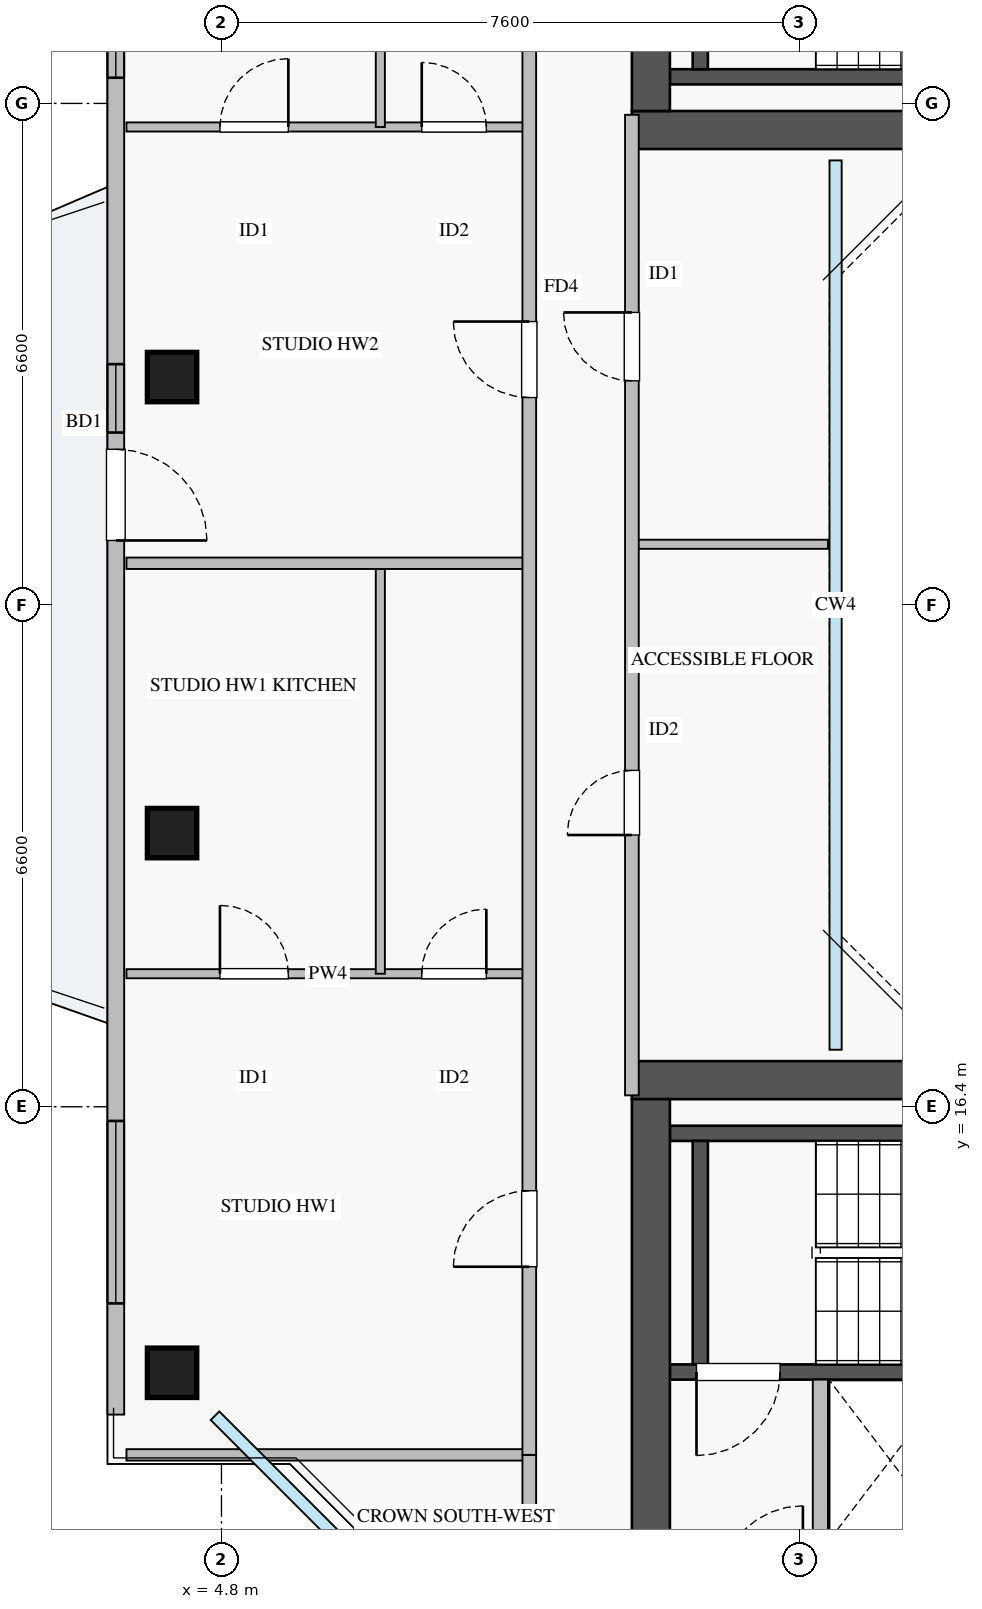
"""IFC4 building model, lengths in metres.
Left out: names, types, materials, properties, quantities, classifications, styles, units other than length and angle.
Written with IfcOpenShell. Run it as: python <this file> out.ifc"""

import sys

from ifc_helpers import new_model, si_unit, direction, frame, frame_2d, origin, origin_2d, place, context, subcontext, project, spatial, rectangle, extrude, source, transform, mapped, element, fill, save


model = new_model("IFC4")
c1 = context("Model", 3, precision=1e-05, world=origin(), true_north=direction((0.0, 1.0)))
c2 = subcontext(c1, "Body", "Model", "MODEL_VIEW")
j1 = project(units=[si_unit("LENGTHUNIT", "METRE"), si_unit("PLANEANGLEUNIT", "RADIAN")], contexts=[c1])
p1 = place(None, origin())
s1 = spatial("IfcSite", under=j1, at=p1, CompositionType="ELEMENT")
p2 = place(p1, origin())
s2 = spatial("IfcBuilding", under=s1, at=p2, CompositionType="ELEMENT")
p3 = place(p2, frame((0.0, 0.0, 250.25)))
s3 = spatial("IfcBuildingStorey", under=s2, at=p3, CompositionType="ELEMENT", Elevation=250.25)
p4 = place(p3, frame((12.68, 12.8, 0.0), z_axis=(0.0, 0.0, 1.0), x_axis=(1.0, 0.0, 0.0)))
e1 = element("IfcWall", 1, at=p4, inside=s3, PredefinedType="SHEAR", context=c2, shape_type="SweptSolid", body=[
    extrude(rectangle(XDim=1.94, YDim=0.18, at=frame_2d((0.97, 0.0))), origin(), (0.0, 0.0, 1.0), 3.07),
])
p5 = place(p3, frame((10.7, 29.95, 0.0), z_axis=(0.0, 0.0, 1.0), x_axis=(1.0, 0.0, 0.0)))
e2 = element("IfcWall", 2, at=p5, inside=s3, PredefinedType="SHEAR", context=c2, shape_type="SweptSolid", body=[
    extrude(rectangle(XDim=7.45, YDim=0.2, at=frame_2d((3.725, 0.0))), origin(), (0.0, 0.0, 1.0), 3.25),
])
p6 = place(p3, frame((11.1, 30.05, 0.0), z_axis=(0.0, 0.0, 1.0), x_axis=(0.0, 1.0, 0.0)))
e3 = element("IfcWall", 3, at=p6, inside=s3, PredefinedType="SHEAR", context=c2, shape_type="SweptSolid", body=[
    extrude(rectangle(XDim=2.94, YDim=0.2, at=frame_2d((1.47, 0.0))), origin(), (0.0, 0.0, 1.0), 3.25),
])
p7 = place(p3, frame((10.7, 12.91, 0.0), z_axis=(0.0, 0.0, 1.0), x_axis=(1.0, 0.0, 0.0)))
e4 = element("IfcWall", 4, at=p7, inside=s3, PredefinedType="SHEAR", context=c2, shape_type="SweptSolid", body=[
    extrude(rectangle(XDim=7.45, YDim=0.2, at=frame_2d((3.725, 0.0))), origin(), (0.0, 0.0, 1.0), 3.25),
])
p8 = place(p7, frame((0.35, 0.0, 0.0)))
e5 = element("IfcOpeningElement", 5, at=p8, cuts=e4, PredefinedType="OPENING", context=c2, shape_type="SweptSolid", body=[
    extrude(rectangle(XDim=1.1, YDim=2.05, at=frame_2d((0.55, 1.025))), frame((0.0, 0.11, 0.0), z_axis=(0.0, -1.0, 0.0), x_axis=(1.0, 0.0, 0.0)), (0.0, 0.0, 1.0), 0.22),
])
p9 = place(p3, frame((10.7, 16.05, 0.0), z_axis=(0.0, 0.0, 1.0), x_axis=(1.0, 0.0, 0.0)))
e6 = element("IfcWall", 6, at=p9, inside=s3, PredefinedType="SHEAR", context=c2, shape_type="SweptSolid", body=[
    extrude(rectangle(XDim=7.45, YDim=0.2, at=frame_2d((3.725, 0.0))), origin(), (0.0, 0.0, 1.0), 3.25),
])
p10 = place(p3, frame((11.1, 13.01, 0.0), z_axis=(0.0, 0.0, 1.0), x_axis=(0.0, 1.0, 0.0)))
e7 = element("IfcWall", 7, at=p10, inside=s3, PredefinedType="SHEAR", context=c2, shape_type="SweptSolid", body=[
    extrude(rectangle(XDim=2.94, YDim=0.2, at=frame_2d((1.47, 0.0))), origin(), (0.0, 0.0, 1.0), 3.25),
])
p11 = place(p3, frame((10.2, 29.25, 0.0), z_axis=(0.0, 0.0, 1.0), x_axis=(1.0, 0.0, 0.0)))
e8 = element("IfcWall", 8, at=p11, inside=s3, PredefinedType="SHEAR", context=c2, shape_type="SweptSolid", body=[
    extrude(rectangle(XDim=17.6, YDim=0.5, at=frame_2d((8.8, 0.0))), origin(), (0.0, 0.0, 1.0), 3.25),
])
p12 = place(p3, frame((10.45, 29.5, 0.0), z_axis=(0.0, 0.0, 1.0), x_axis=(0.0, 1.0, 0.0)))
e9 = element("IfcWall", 9, at=p12, inside=s3, PredefinedType="SHEAR", context=c2, shape_type="SweptSolid", body=[
    extrude(rectangle(XDim=6.2, YDim=0.5, at=frame_2d((3.1, 0.0))), origin(), (0.0, 0.0, 1.0), 3.25),
])
p13 = place(p3, frame((10.2, 16.75, 0.0), z_axis=(0.0, 0.0, 1.0), x_axis=(1.0, 0.0, 0.0)))
e10 = element("IfcWall", 10, at=p13, inside=s3, PredefinedType="SHEAR", context=c2, shape_type="SweptSolid", body=[
    extrude(rectangle(XDim=17.6, YDim=0.5, at=frame_2d((8.8, 0.0))), origin(), (0.0, 0.0, 1.0), 3.25),
])
p14 = place(p3, frame((10.45, 10.3, 0.0), z_axis=(0.0, 0.0, 1.0), x_axis=(0.0, 1.0, 0.0)))
e11 = element("IfcWall", 11, at=p14, inside=s3, PredefinedType="SHEAR", context=c2, shape_type="SweptSolid", body=[
    extrude(rectangle(XDim=6.2, YDim=0.5, at=frame_2d((3.1, 0.0))), origin(), (0.0, 0.0, 1.0), 3.25),
])
m1 = source(origin(), c2, "Body", "SweptSolid", [
    extrude(rectangle(XDim=0.65, YDim=0.65, at=origin_2d()), origin(), (0.0, 0.0, 1.0), 3.25),
])
for number, where, z_axis, x_axis in (
    (12, (4.15, 26.0, 0.0), (0.0, 0.0, 1.0), (1.0, 0.0, 0.0)),
    (13, (4.15, 20.0, 0.0), (0.0, 0.0, 1.0), (1.0, 0.0, 0.0)),
    (14, (4.15, 12.9, 0.0), (0.0, 0.0, 1.0), (1.0, 0.0, 0.0)),
):
    element("IfcColumn", number, at=place(p3, frame(where, z_axis=z_axis, x_axis=x_axis)), inside=s3, PredefinedType="COLUMN", context=c2, shape_type="MappedRepresentation", body=[
        mapped(m1, transform((0.0, 0.0, 0.0), x_axis=(1.0, 0.0, 0.0), y_axis=(0.0, 1.0, 0.0), z_axis=(0.0, 0.0, 1.0), scale=1.0)),
    ])
p15 = place(p3, frame((3.41, 12.35, 0.0), z_axis=(0.0, 0.0, 1.0), x_axis=(0.0, 1.0, 0.0)))
e15 = element("IfcWall", 15, at=p15, inside=s3, PredefinedType="STANDARD", context=c2, shape_type="SweptSolid", body=[
    extrude(rectangle(XDim=21.3, YDim=0.22, at=frame_2d((10.65, 0.0))), origin(), (0.0, 0.0, 1.0), 2.61),
])
p16 = place(p15, frame((11.5, 0.0, 0.0)))
e16 = element("IfcOpeningElement", 16, at=p16, cuts=e15, PredefinedType="OPENING", context=c2, shape_type="SweptSolid", body=[
    extrude(rectangle(XDim=1.2, YDim=2.1, at=frame_2d((0.6, 1.05))), frame((0.0, 0.12, 0.0), z_axis=(0.0, -1.0, 0.0), x_axis=(1.0, 0.0, 0.0)), (0.0, 0.0, 1.0), 0.24),
])
p17 = place(p15, frame((1.463, 0.0, 0.9)))
e17 = element("IfcOpeningElement", 17, at=p17, cuts=e15, PredefinedType="OPENING", context=c2, shape_type="SweptSolid", body=[
    extrude(rectangle(XDim=2.4, YDim=1.48, at=frame_2d((1.2, 0.74))), frame((0.0, 0.12, 0.0), z_axis=(0.0, -1.0, 0.0), x_axis=(1.0, 0.0, 0.0)), (0.0, 0.0, 1.0), 0.24),
])
p18 = place(p15, frame((17.588, 0.0, 0.9)))
e18 = element("IfcOpeningElement", 18, at=p18, cuts=e15, PredefinedType="OPENING", context=c2, shape_type="SweptSolid", body=[
    extrude(rectangle(XDim=2.1, YDim=1.48, at=frame_2d((1.05, 0.74))), frame((0.0, 0.12, 0.0), z_axis=(0.0, -1.0, 0.0), x_axis=(1.0, 0.0, 0.0)), (0.0, 0.0, 1.0), 0.24),
])
p19 = place(p15, frame((12.92, 0.0, 0.9)))
e19 = element("IfcOpeningElement", 19, at=p19, cuts=e15, PredefinedType="OPENING", context=c2, shape_type="SweptSolid", body=[
    extrude(rectangle(XDim=0.9, YDim=1.2, at=frame_2d((0.45, 0.6))), frame((0.0, 0.12, 0.0), z_axis=(0.0, -1.0, 0.0), x_axis=(1.0, 0.0, 0.0)), (0.0, 0.0, 1.0), 0.24),
])
p20 = place(p3, frame((12.68, 10.6, 0.0), z_axis=(0.0, 0.0, 1.0), x_axis=(0.0, 1.0, 0.0)))
e20 = element("IfcWall", 20, at=p20, inside=s3, PredefinedType="PARTITIONING", context=c2, shape_type="SweptSolid", body=[
    extrude(rectangle(XDim=2.21, YDim=0.2, at=frame_2d((1.105, 0.0))), origin(), (0.0, 0.0, 1.0), 3.07),
])
p21 = place(p3, frame((3.55, 11.82, 0.0), z_axis=(0.0, 0.0, 1.0), x_axis=(1.0, 0.0, 0.0)))
e21 = element("IfcWall", 21, at=p21, inside=s3, PredefinedType="PARTITIONING", context=c2, shape_type="SweptSolid", body=[
    extrude(rectangle(XDim=5.3, YDim=0.15, at=frame_2d((2.65, 0.0))), origin(), (0.0, 0.0, 1.0), 3.07),
])
p22 = place(p3, frame((8.85, 8.56, 0.0), z_axis=(0.0, 0.0, 1.0), x_axis=(0.0, 1.0, 0.0)))
e22 = element("IfcWall", 22, at=p22, inside=s3, PredefinedType="PARTITIONING", context=c2, shape_type="SweptSolid", body=[
    extrude(rectangle(XDim=3.26, YDim=0.18, at=frame_2d((1.63, 0.0))), origin(), (0.0, 0.0, 1.0), 2.569),
])
p23 = place(p3, frame((3.55, 18.15, 0.0), z_axis=(0.0, 0.0, 1.0), x_axis=(1.0, 0.0, 0.0)))
e23 = element("IfcWall", 23, at=p23, inside=s3, PredefinedType="PLUMBINGWALL", context=c2, shape_type="SweptSolid", body=[
    extrude(rectangle(XDim=5.3, YDim=0.12, at=frame_2d((2.65, 0.0))), origin(), (0.0, 0.0, 1.0), 2.821),
])
p24 = place(p23, frame((1.23, 0.0, 0.0)))
e24 = element("IfcOpeningElement", 24, at=p24, cuts=e23, PredefinedType="OPENING", context=c2, shape_type="SweptSolid", body=[
    extrude(rectangle(XDim=0.9, YDim=2.05, at=frame_2d((0.45, 1.025))), frame((0.0, 0.07, 0.0), z_axis=(0.0, -1.0, 0.0), x_axis=(1.0, 0.0, 0.0)), (0.0, 0.0, 1.0), 0.14),
])
p25 = place(p23, frame((3.885, 0.0, 0.0)))
e25 = element("IfcOpeningElement", 25, at=p25, cuts=e23, PredefinedType="OPENING", context=c2, shape_type="SweptSolid", body=[
    extrude(rectangle(XDim=0.85, YDim=2.05, at=frame_2d((0.425, 1.025))), frame((0.0, 0.07, 0.0), z_axis=(0.0, -1.0, 0.0), x_axis=(1.0, 0.0, 0.0)), (0.0, 0.0, 1.0), 0.14),
])
p26 = place(p3, frame((6.89, 18.15, 0.0), z_axis=(0.0, 0.0, 1.0), x_axis=(0.0, 1.0, 0.0)))
e26 = element("IfcWall", 26, at=p26, inside=s3, PredefinedType="PLUMBINGWALL", context=c2, shape_type="SweptSolid", body=[
    extrude(rectangle(XDim=5.4, YDim=0.12, at=frame_2d((2.7, 0.0))), origin(), (0.0, 0.0, 1.0), 3.07),
])
p27 = place(p3, frame((3.55, 29.29, 0.0), z_axis=(0.0, 0.0, 1.0), x_axis=(1.0, 0.0, 0.0)))
e27 = element("IfcWall", 27, at=p27, inside=s3, PredefinedType="PLUMBINGWALL", context=c2, shape_type="SweptSolid", body=[
    extrude(rectangle(XDim=5.3, YDim=0.12, at=frame_2d((2.65, 0.0))), origin(), (0.0, 0.0, 1.0), 3.07),
])
p28 = place(p27, frame((1.23, 0.0, 0.0)))
e28 = element("IfcOpeningElement", 28, at=p28, cuts=e27, PredefinedType="OPENING", context=c2, shape_type="SweptSolid", body=[
    extrude(rectangle(XDim=0.9, YDim=2.05, at=frame_2d((0.45, 1.025))), frame((0.0, 0.07, 0.0), z_axis=(0.0, -1.0, 0.0), x_axis=(1.0, 0.0, 0.0)), (0.0, 0.0, 1.0), 0.14),
])
p29 = place(p27, frame((3.885, 0.0, 0.0)))
e29 = element("IfcOpeningElement", 29, at=p29, cuts=e27, PredefinedType="OPENING", context=c2, shape_type="SweptSolid", body=[
    extrude(rectangle(XDim=0.85, YDim=2.05, at=frame_2d((0.425, 1.025))), frame((0.0, 0.07, 0.0), z_axis=(0.0, -1.0, 0.0), x_axis=(1.0, 0.0, 0.0)), (0.0, 0.0, 1.0), 0.14),
])
p30 = place(p3, frame((6.89, 29.29, 0.0), z_axis=(0.0, 0.0, 1.0), x_axis=(0.0, 1.0, 0.0)))
e30 = element("IfcWall", 30, at=p30, inside=s3, PredefinedType="PLUMBINGWALL", context=c2, shape_type="SweptSolid", body=[
    extrude(rectangle(XDim=4.89, YDim=0.12, at=frame_2d((2.445, 0.0))), origin(), (0.0, 0.0, 1.0), 3.07),
])
p31 = place(p3, frame((3.55, 23.55, 0.0), z_axis=(0.0, 0.0, 1.0), x_axis=(1.0, 0.0, 0.0)))
e31 = element("IfcWall", 31, at=p31, inside=s3, PredefinedType="PARTITIONING", context=c2, shape_type="SweptSolid", body=[
    extrude(rectangle(XDim=5.3, YDim=0.15, at=frame_2d((2.65, 0.0))), origin(), (0.0, 0.0, 1.0), 3.07),
])
p32 = place(p3, frame((8.85, 11.82, 0.0), z_axis=(0.0, 0.0, 1.0), x_axis=(0.0, 1.0, 0.0)))
e32 = element("IfcWall", 32, at=p32, inside=s3, PredefinedType="PARTITIONING", context=c2, shape_type="SweptSolid", body=[
    extrude(rectangle(XDim=22.36, YDim=0.18, at=frame_2d((11.18, 0.0))), origin(), (0.0, 0.0, 1.0), 2.569),
])
p33 = place(p32, frame((2.475, 0.0, 0.0)))
e33 = element("IfcOpeningElement", 33, at=p33, cuts=e32, PredefinedType="OPENING", context=c2, shape_type="SweptSolid", body=[
    extrude(rectangle(XDim=1.0, YDim=2.05, at=frame_2d((0.5, 1.025))), frame((0.0, 0.1, 0.0), z_axis=(0.0, -1.0, 0.0), x_axis=(1.0, 0.0, 0.0)), (0.0, 0.0, 1.0), 0.2),
])
p34 = place(p32, frame((13.91, 0.0, 0.0)))
e34 = element("IfcOpeningElement", 34, at=p34, cuts=e32, PredefinedType="OPENING", context=c2, shape_type="SweptSolid", body=[
    extrude(rectangle(XDim=1.0, YDim=2.05, at=frame_2d((0.5, 1.025))), frame((0.0, 0.1, 0.0), z_axis=(0.0, -1.0, 0.0), x_axis=(1.0, 0.0, 0.0)), (0.0, 0.0, 1.0), 0.2),
])
p35 = place(p3, frame((10.2, 23.8, 0.0), z_axis=(0.0, 0.0, 1.0), x_axis=(1.0, 0.0, 0.0)))
e35 = element("IfcWall", 35, at=p35, inside=s3, PredefinedType="PLUMBINGWALL", context=c2, shape_type="SweptSolid", body=[
    extrude(rectangle(XDim=2.58, YDim=0.12, at=frame_2d((1.29, 0.0))), origin(), (0.0, 0.0, 1.0), 3.07),
])
p36 = place(p3, frame((10.2, 16.55, 0.0), z_axis=(0.0, 0.0, 1.0), x_axis=(0.0, 1.0, 0.0)))
e36 = element("IfcWall", 36, at=p36, inside=s3, PredefinedType="PARTITIONING", context=c2, shape_type="SweptSolid", body=[
    extrude(rectangle(XDim=12.9, YDim=0.18, at=frame_2d((6.45, 0.0))), origin(), (0.0, 0.0, 1.0), 3.07),
])
p37 = place(p36, frame((3.425, 0.0, 0.0)))
e37 = element("IfcOpeningElement", 37, at=p37, cuts=e36, PredefinedType="OPENING", context=c2, shape_type="SweptSolid", body=[
    extrude(rectangle(XDim=0.85, YDim=2.05, at=frame_2d((0.425, 1.025))), frame((0.0, 0.1, 0.0), z_axis=(0.0, -1.0, 0.0), x_axis=(1.0, 0.0, 0.0)), (0.0, 0.0, 1.0), 0.2),
])
p38 = place(p36, frame((9.4, 0.0, 0.0)))
e38 = element("IfcOpeningElement", 38, at=p38, cuts=e36, PredefinedType="OPENING", context=c2, shape_type="SweptSolid", body=[
    extrude(rectangle(XDim=0.9, YDim=2.05, at=frame_2d((0.45, 1.025))), frame((0.0, 0.1, 0.0), z_axis=(0.0, -1.0, 0.0), x_axis=(1.0, 0.0, 0.0)), (0.0, 0.0, 1.0), 0.2),
])
m2 = source(origin(), c2, "Body", "SweptSolid", [
    extrude(rectangle(XDim=1.2, YDim=2.1, at=frame_2d((0.6, 1.05))), frame((0.0, 0.025, 0.0), z_axis=(0.0, -1.0, 0.0), x_axis=(1.0, 0.0, 0.0)), (0.0, 0.0, 1.0), 0.05),
])
p39 = place(p16, frame((1.2, 0.0, 0.0), z_axis=(0.0, 0.0, 1.0), x_axis=(-1.0, 0.0, 0.0)))
e39 = element("IfcDoor", 39, at=p39, inside=s3, OperationType="SINGLE_SWING_LEFT", PredefinedType="DOOR", context=c2, shape_type="MappedRepresentation", body=[
    mapped(m2, transform((0.0, 0.0, 0.0), x_axis=(1.0, 0.0, 0.0), y_axis=(0.0, 1.0, 0.0), z_axis=(0.0, 0.0, 1.0), scale=1.0)),
])
fill(e16, e39)
m3 = source(origin(), c2, "Body", "SweptSolid", [
    extrude(rectangle(XDim=2.4, YDim=1.48, at=frame_2d((1.2, 0.74))), frame((0.0, 0.03, 0.0), z_axis=(0.0, -1.0, 0.0), x_axis=(1.0, 0.0, 0.0)), (0.0, 0.0, 1.0), 0.06),
])
p40 = place(p17, origin())
e40 = element("IfcWindow", 40, at=p40, inside=s3, PartitioningType="TRIPLE_PANEL_VERTICAL", PredefinedType="WINDOW", context=c2, shape_type="MappedRepresentation", body=[
    mapped(m3, transform((0.0, 0.0, 0.0), x_axis=(1.0, 0.0, 0.0), y_axis=(0.0, 1.0, 0.0), z_axis=(0.0, 0.0, 1.0), scale=1.0)),
])
fill(e17, e40)
m4 = source(origin(), c2, "Body", "SweptSolid", [
    extrude(rectangle(XDim=2.1, YDim=1.48, at=frame_2d((1.05, 0.74))), frame((0.0, 0.03, 0.0), z_axis=(0.0, -1.0, 0.0), x_axis=(1.0, 0.0, 0.0)), (0.0, 0.0, 1.0), 0.06),
])
p41 = place(p18, origin())
e41 = element("IfcWindow", 41, at=p41, inside=s3, PartitioningType="TRIPLE_PANEL_VERTICAL", PredefinedType="WINDOW", context=c2, shape_type="MappedRepresentation", body=[
    mapped(m4, transform((0.0, 0.0, 0.0), x_axis=(1.0, 0.0, 0.0), y_axis=(0.0, 1.0, 0.0), z_axis=(0.0, 0.0, 1.0), scale=1.0)),
])
fill(e18, e41)
m5 = source(origin(), c2, "Body", "SweptSolid", [
    extrude(rectangle(XDim=1.1, YDim=2.05, at=frame_2d((0.55, 1.025))), frame((0.0, 0.025, 0.0), z_axis=(0.0, -1.0, 0.0), x_axis=(1.0, 0.0, 0.0)), (0.0, 0.0, 1.0), 0.05),
])
p42 = place(p8, frame((1.1, 0.0, 0.0), z_axis=(0.0, 0.0, 1.0), x_axis=(-1.0, 0.0, 0.0)))
e42 = element("IfcDoor", 42, at=p42, inside=s3, OperationType="SINGLE_SWING_LEFT", PredefinedType="DOOR", context=c2, shape_type="MappedRepresentation", body=[
    mapped(m5, transform((0.0, 0.0, 0.0), x_axis=(1.0, 0.0, 0.0), y_axis=(0.0, 1.0, 0.0), z_axis=(0.0, 0.0, 1.0), scale=1.0)),
])
fill(e5, e42)
m6 = source(origin(), c2, "Body", "SweptSolid", [
    extrude(rectangle(XDim=0.9, YDim=2.05, at=frame_2d((0.45, 1.025))), frame((0.0, 0.025, 0.0), z_axis=(0.0, -1.0, 0.0), x_axis=(1.0, 0.0, 0.0)), (0.0, 0.0, 1.0), 0.05),
])
p43 = place(p24, origin())
e43 = element("IfcDoor", 43, at=p43, inside=s3, OperationType="SINGLE_SWING_LEFT", PredefinedType="DOOR", context=c2, shape_type="MappedRepresentation", body=[
    mapped(m6, transform((0.0, 0.0, 0.0), x_axis=(1.0, 0.0, 0.0), y_axis=(0.0, 1.0, 0.0), z_axis=(0.0, 0.0, 1.0), scale=1.0)),
])
fill(e24, e43)
m7 = source(origin(), c2, "Body", "SweptSolid", [
    extrude(rectangle(XDim=0.85, YDim=2.05, at=frame_2d((0.425, 1.025))), frame((0.0, 0.025, 0.0), z_axis=(0.0, -1.0, 0.0), x_axis=(1.0, 0.0, 0.0)), (0.0, 0.0, 1.0), 0.05),
])
p44 = place(p25, origin())
e44 = element("IfcDoor", 44, at=p44, inside=s3, OperationType="SINGLE_SWING_RIGHT", PredefinedType="DOOR", context=c2, shape_type="MappedRepresentation", body=[
    mapped(m7, transform((0.0, 0.0, 0.0), x_axis=(1.0, 0.0, 0.0), y_axis=(0.0, 1.0, 0.0), z_axis=(0.0, 0.0, 1.0), scale=1.0)),
])
fill(e25, e44)
p45 = place(p28, origin())
e45 = element("IfcDoor", 45, at=p45, inside=s3, OperationType="SINGLE_SWING_RIGHT", PredefinedType="DOOR", context=c2, shape_type="MappedRepresentation", body=[
    mapped(m6, transform((0.0, 0.0, 0.0), x_axis=(1.0, 0.0, 0.0), y_axis=(0.0, 1.0, 0.0), z_axis=(0.0, 0.0, 1.0), scale=1.0)),
])
fill(e28, e45)
p46 = place(p29, origin())
e46 = element("IfcDoor", 46, at=p46, inside=s3, OperationType="SINGLE_SWING_LEFT", PredefinedType="DOOR", context=c2, shape_type="MappedRepresentation", body=[
    mapped(m7, transform((0.0, 0.0, 0.0), x_axis=(1.0, 0.0, 0.0), y_axis=(0.0, 1.0, 0.0), z_axis=(0.0, 0.0, 1.0), scale=1.0)),
])
fill(e29, e46)
m8 = source(origin(), c2, "Body", "SweptSolid", [
    extrude(rectangle(XDim=1.0, YDim=2.05, at=frame_2d((0.5, 1.025))), frame((0.0, 0.025, 0.0), z_axis=(0.0, -1.0, 0.0), x_axis=(1.0, 0.0, 0.0)), (0.0, 0.0, 1.0), 0.05),
])
p47 = place(p33, origin())
e47 = element("IfcDoor", 47, at=p47, inside=s3, OperationType="SINGLE_SWING_LEFT", PredefinedType="DOOR", context=c2, shape_type="MappedRepresentation", body=[
    mapped(m8, transform((0.0, 0.0, 0.0), x_axis=(1.0, 0.0, 0.0), y_axis=(0.0, 1.0, 0.0), z_axis=(0.0, 0.0, 1.0), scale=1.0)),
])
fill(e33, e47)
p48 = place(p34, origin())
e48 = element("IfcDoor", 48, at=p48, inside=s3, OperationType="SINGLE_SWING_RIGHT", PredefinedType="DOOR", context=c2, shape_type="MappedRepresentation", body=[
    mapped(m8, transform((0.0, 0.0, 0.0), x_axis=(1.0, 0.0, 0.0), y_axis=(0.0, 1.0, 0.0), z_axis=(0.0, 0.0, 1.0), scale=1.0)),
])
fill(e34, e48)
p49 = place(p37, origin())
e49 = element("IfcDoor", 49, at=p49, inside=s3, OperationType="SINGLE_SWING_LEFT", PredefinedType="DOOR", context=c2, shape_type="MappedRepresentation", body=[
    mapped(m7, transform((0.0, 0.0, 0.0), x_axis=(1.0, 0.0, 0.0), y_axis=(0.0, 1.0, 0.0), z_axis=(0.0, 0.0, 1.0), scale=1.0)),
])
fill(e37, e49)
p50 = place(p38, origin())
e50 = element("IfcDoor", 50, at=p50, inside=s3, OperationType="SINGLE_SWING_RIGHT", PredefinedType="DOOR", context=c2, shape_type="MappedRepresentation", body=[
    mapped(m6, transform((0.0, 0.0, 0.0), x_axis=(1.0, 0.0, 0.0), y_axis=(0.0, 1.0, 0.0), z_axis=(0.0, 0.0, 1.0), scale=1.0)),
])
fill(e38, e50)
m9 = source(origin(), c2, "Body", "SweptSolid", [
    extrude(rectangle(XDim=0.9, YDim=1.2, at=frame_2d((0.45, 0.6))), frame((0.0, 0.03, 0.0), z_axis=(0.0, -1.0, 0.0), x_axis=(1.0, 0.0, 0.0)), (0.0, 0.0, 1.0), 0.06),
])
p51 = place(p19, origin())
e51 = element("IfcWindow", 51, at=p51, inside=s3, PartitioningType="SINGLE_PANEL", PredefinedType="WINDOW", context=c2, shape_type="MappedRepresentation", body=[
    mapped(m9, transform((0.0, 0.0, 0.0), x_axis=(1.0, 0.0, 0.0), y_axis=(0.0, 1.0, 0.0), z_axis=(0.0, 0.0, 1.0), scale=1.0)),
])
fill(e19, e51)
save(model, sys.argv[1])
